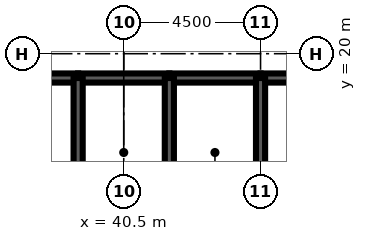
"""IFC4 building model, lengths in metres.
Left out: names, types, materials, properties, quantities, classifications, styles, units other than length and angle.
Written with IfcOpenShell. Run it as: python <this file> out.ifc"""

import sys

from ifc_helpers import new_model, si_unit, direction, frame, frame_2d, origin, place, context, subcontext, project, spatial, rectangle, extrude, element, fill, save


model = new_model("IFC4")
c1 = context("Model", 3, precision=1e-05, world=origin(), true_north=direction((0.0, 1.0)))
c2 = subcontext(c1, "Body", "Model", "MODEL_VIEW")
j1 = project(units=[si_unit("LENGTHUNIT", "METRE"), si_unit("PLANEANGLEUNIT", "RADIAN")], contexts=[c1])
p1 = place(None, origin())
s1 = spatial("IfcSite", under=j1, at=p1, CompositionType="ELEMENT")
p2 = place(p1, origin())
s2 = spatial("IfcBuilding", under=s1, at=p2, CompositionType="ELEMENT")
p3 = place(p2, frame((0.0, 0.0, 329.9)))
s3 = spatial("IfcBuildingStorey", under=s2, at=p3, CompositionType="ELEMENT", Elevation=329.9)
p4 = place(p3, frame((36.0, 19.2, 0.0), z_axis=(0.0, 0.0, 1.0), x_axis=(1.0, 0.0, 0.0)))
e1 = element("IfcWall", 1, at=p4, inside=s3, PredefinedType="SOLIDWALL", context=c2, shape_type="SweptSolid", body=[
    extrude(rectangle(XDim=3.0, YDim=0.3, at=frame_2d((1.5, 0.0))), origin(), (0.0, 0.0, 1.0), 4.2),
])
p5 = place(p4, frame((0.95, 0.0, 0.0)))
e2 = element("IfcOpeningElement", 2, at=p5, cuts=e1, PredefinedType="OPENING", context=c2, shape_type="SweptSolid", body=[
    extrude(rectangle(XDim=1.1, YDim=2.2, at=frame_2d((0.55, 1.1))), frame((0.0, 0.16, 0.0), z_axis=(0.0, -1.0, 0.0), x_axis=(1.0, 0.0, 0.0)), (0.0, 0.0, 1.0), 0.32),
])
p6 = place(p3, frame((39.0, 19.2, 0.0), z_axis=(0.0, 0.0, 1.0), x_axis=(1.0, 0.0, 0.0)))
e3 = element("IfcWall", 3, at=p6, inside=s3, PredefinedType="SOLIDWALL", context=c2, shape_type="SweptSolid", body=[
    extrude(rectangle(XDim=3.0, YDim=0.3, at=frame_2d((1.5, 0.0))), origin(), (0.0, 0.0, 1.0), 4.2),
])
p7 = place(p6, frame((1.0, 0.0, 0.0)))
e4 = element("IfcOpeningElement", 4, at=p7, cuts=e3, PredefinedType="OPENING", context=c2, shape_type="SweptSolid", body=[
    extrude(rectangle(XDim=1.0, YDim=2.1, at=frame_2d((0.5, 1.05))), frame((0.0, 0.16, 0.0), z_axis=(0.0, -1.0, 0.0), x_axis=(1.0, 0.0, 0.0)), (0.0, 0.0, 1.0), 0.32),
])
p8 = place(p3, frame((42.0, 19.2, 0.0), z_axis=(0.0, 0.0, 1.0), x_axis=(1.0, 0.0, 0.0)))
e5 = element("IfcWall", 5, at=p8, inside=s3, PredefinedType="SOLIDWALL", context=c2, shape_type="SweptSolid", body=[
    extrude(rectangle(XDim=3.0, YDim=0.3, at=frame_2d((1.5, 0.0))), origin(), (0.0, 0.0, 1.0), 4.2),
])
p9 = place(p8, frame((1.0, 0.0, 0.0)))
e6 = element("IfcOpeningElement", 6, at=p9, cuts=e5, PredefinedType="OPENING", context=c2, shape_type="SweptSolid", body=[
    extrude(rectangle(XDim=1.0, YDim=2.1, at=frame_2d((0.5, 1.05))), frame((0.0, 0.16, 0.0), z_axis=(0.0, -1.0, 0.0), x_axis=(1.0, 0.0, 0.0)), (0.0, 0.0, 1.0), 0.32),
])
p10 = place(p3, frame((45.0, 19.2, 0.0), z_axis=(0.0, 0.0, 1.0), x_axis=(1.0, 0.0, 0.0)))
e7 = element("IfcWall", 7, at=p10, inside=s3, PredefinedType="SOLIDWALL", context=c2, shape_type="SweptSolid", body=[
    extrude(rectangle(XDim=9.0, YDim=0.3, at=frame_2d((4.5, 0.0))), origin(), (0.0, 0.0, 1.0), 4.2),
])
p11 = place(p10, frame((7.35, 0.0, 0.0)))
e8 = element("IfcOpeningElement", 8, at=p11, cuts=e7, PredefinedType="OPENING", context=c2, shape_type="SweptSolid", body=[
    extrude(rectangle(XDim=1.0, YDim=2.1, at=frame_2d((0.5, 1.05))), frame((0.0, 0.16, 0.0), z_axis=(0.0, -1.0, 0.0), x_axis=(1.0, 0.0, 0.0)), (0.0, 0.0, 1.0), 0.32),
])
for number, where, z_axis, x_axis in (
    (9, (39.0, 16.0, 0.0), (0.0, 0.0, 1.0), (0.0, 1.0, 0.0)),
    (10, (42.0, 16.0, 0.0), (0.0, 0.0, 1.0), (0.0, 1.0, 0.0)),
    (11, (45.0, 16.0, 0.0), (0.0, 0.0, 1.0), (0.0, 1.0, 0.0)),
):
    element("IfcWall", number, at=place(p3, frame(where, z_axis=z_axis, x_axis=x_axis)), inside=s3, PredefinedType="SOLIDWALL", context=c2, shape_type="SweptSolid", body=[
        extrude(rectangle(XDim=3.2, YDim=0.3, at=frame_2d((1.6, 0.0))), origin(), (0.0, 0.0, 1.0), 4.2),
    ])
p12 = place(p3, frame((39.15, 17.3, 0.0), z_axis=(0.0, 0.0, 1.0), x_axis=(1.0, 0.0, 0.0)))
e12 = element("IfcWall", 12, at=p12, inside=s3, PredefinedType="SOLIDWALL", context=c2, shape_type="SweptSolid", body=[
    extrude(rectangle(XDim=2.7, YDim=0.3, at=frame_2d((1.35, 0.0))), origin(), (0.0, 0.0, 1.0), 3.95),
])
p13 = place(p12, frame((0.85, 0.0, 0.0)))
e13 = element("IfcOpeningElement", 13, at=p13, cuts=e12, PredefinedType="OPENING", context=c2, shape_type="SweptSolid", body=[
    extrude(rectangle(XDim=1.0, YDim=2.1, at=frame_2d((0.5, 1.05))), frame((0.0, 0.16, 0.0), z_axis=(0.0, -1.0, 0.0), x_axis=(1.0, 0.0, 0.0)), (0.0, 0.0, 1.0), 0.32),
])
p14 = place(p3, frame((42.15, 17.3, 0.0), z_axis=(0.0, 0.0, 1.0), x_axis=(1.0, 0.0, 0.0)))
e14 = element("IfcWall", 14, at=p14, inside=s3, PredefinedType="SOLIDWALL", context=c2, shape_type="SweptSolid", body=[
    extrude(rectangle(XDim=2.7, YDim=0.3, at=frame_2d((1.35, 0.0))), origin(), (0.0, 0.0, 1.0), 3.95),
])
p15 = place(p14, frame((0.85, 0.0, 0.0)))
e15 = element("IfcOpeningElement", 15, at=p15, cuts=e14, PredefinedType="OPENING", context=c2, shape_type="SweptSolid", body=[
    extrude(rectangle(XDim=1.0, YDim=2.1, at=frame_2d((0.5, 1.05))), frame((0.0, 0.16, 0.0), z_axis=(0.0, -1.0, 0.0), x_axis=(1.0, 0.0, 0.0)), (0.0, 0.0, 1.0), 0.32),
])
p16 = place(p13, origin())
e16 = element("IfcDoor", 16, at=p16, inside=s3, OperationType="SINGLE_SWING_LEFT", PredefinedType="DOOR", context=c2, shape_type="SweptSolid", body=[
    extrude(rectangle(XDim=1.0, YDim=2.1, at=frame_2d((0.5, 1.05))), frame((0.0, 0.025, 0.0), z_axis=(0.0, -1.0, 0.0), x_axis=(1.0, 0.0, 0.0)), (0.0, 0.0, 1.0), 0.05),
])
fill(e13, e16)
p17 = place(p15, origin())
e17 = element("IfcDoor", 17, at=p17, inside=s3, OperationType="SINGLE_SWING_LEFT", PredefinedType="DOOR", context=c2, shape_type="SweptSolid", body=[
    extrude(rectangle(XDim=1.0, YDim=2.1, at=frame_2d((0.5, 1.05))), frame((0.0, 0.025, 0.0), z_axis=(0.0, -1.0, 0.0), x_axis=(1.0, 0.0, 0.0)), (0.0, 0.0, 1.0), 0.05),
])
fill(e15, e17)
p18 = place(p7, origin())
e18 = element("IfcDoor", 18, at=p18, inside=s3, OperationType="SINGLE_SWING_LEFT", PredefinedType="DOOR", context=c2, shape_type="SweptSolid", body=[
    extrude(rectangle(XDim=1.0, YDim=2.1, at=frame_2d((0.5, 1.05))), frame((0.0, 0.025, 0.0), z_axis=(0.0, -1.0, 0.0), x_axis=(1.0, 0.0, 0.0)), (0.0, 0.0, 1.0), 0.05),
])
fill(e4, e18)
p19 = place(p9, origin())
e19 = element("IfcDoor", 19, at=p19, inside=s3, OperationType="SINGLE_SWING_LEFT", PredefinedType="DOOR", context=c2, shape_type="SweptSolid", body=[
    extrude(rectangle(XDim=1.0, YDim=2.1, at=frame_2d((0.5, 1.05))), frame((0.0, 0.025, 0.0), z_axis=(0.0, -1.0, 0.0), x_axis=(1.0, 0.0, 0.0)), (0.0, 0.0, 1.0), 0.05),
])
fill(e6, e19)
save(model, sys.argv[1])
